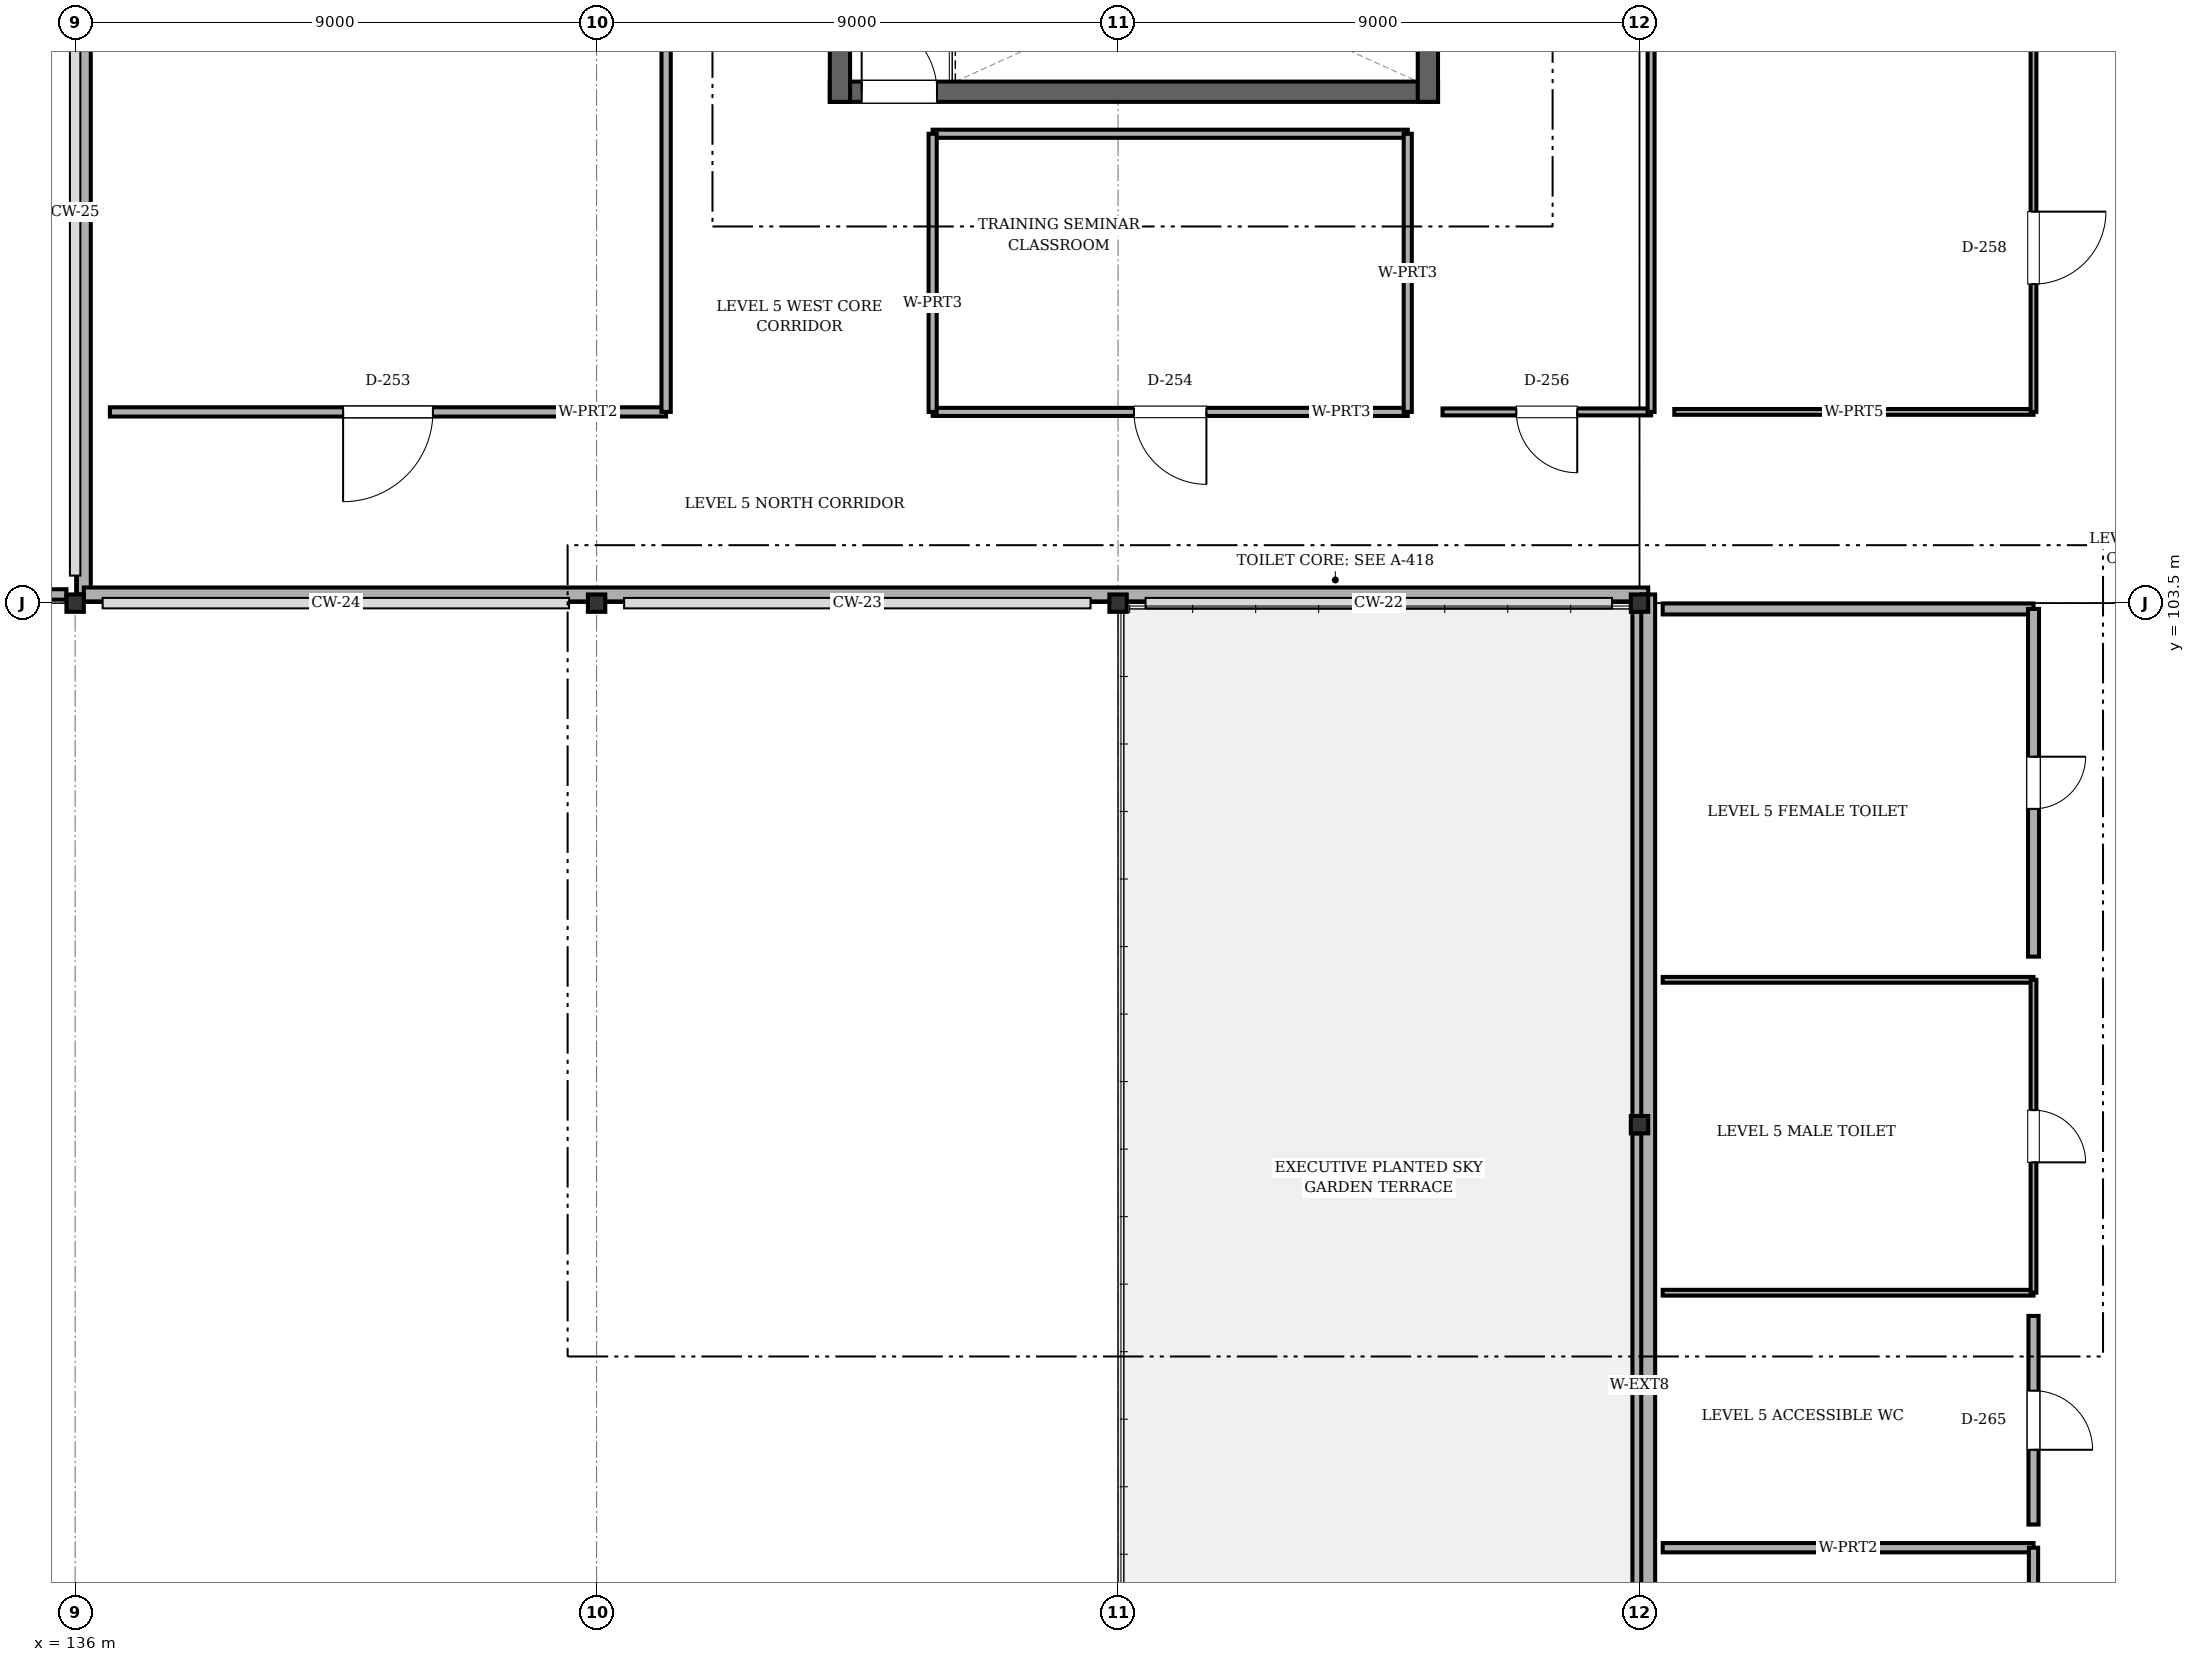
"""IFC4 building model, lengths in metres.
Left out: names, types, materials, properties, quantities, classifications, styles, units other than length and angle.
Written with IfcOpenShell. Run it as: python <this file> out.ifc"""

import sys

from ifc_helpers import new_model, si_unit, direction, frame, frame_2d, origin, origin_2d, place, context, subcontext, project, spatial, rectangle, i_section, extrude, element, fill, save


model = new_model("IFC4")
c1 = context("Model", 3, precision=1e-05, world=origin(), true_north=direction((0.0, 1.0)))
c2 = subcontext(c1, "Body", "Model", "MODEL_VIEW")
j1 = project(units=[si_unit("LENGTHUNIT", "METRE"), si_unit("PLANEANGLEUNIT", "RADIAN")], contexts=[c1])
p1 = place(None, origin())
s1 = spatial("IfcSite", under=j1, at=p1, CompositionType="ELEMENT")
p2 = place(p1, origin())
s2 = spatial("IfcBuilding", under=s1, at=p2, CompositionType="ELEMENT")
p3 = place(p2, frame((0.0, 0.0, 20.8)))
s3 = spatial("IfcBuildingStorey", under=s2, at=p3, CompositionType="ELEMENT", Elevation=20.8)
for number, where, z_axis, x_axis in (
    (1, (136.0, 103.5, 0.0), (0.0, 0.0, 1.0), (1.0, 0.0, 0.0)),
    (2, (145.0, 103.5, 0.0), (0.0, 0.0, 1.0), (1.0, 0.0, 0.0)),
    (3, (154.0, 103.5, 0.0), (0.0, 0.0, 1.0), (1.0, 0.0, 0.0)),
    (4, (163.0, 94.5, 0.0), (0.0, 0.0, 1.0), (1.0, 0.0, 0.0)),
    (5, (163.0, 103.5, 0.0), (0.0, 0.0, 1.0), (1.0, 0.0, 0.0)),
):
    element("IfcColumn", number, at=place(p3, frame(where, z_axis=z_axis, x_axis=x_axis)), inside=s3, PredefinedType="COLUMN", context=c2, shape_type="SweptSolid", body=[
        extrude(i_section(OverallWidth=0.3, OverallDepth=0.3, WebThickness=0.01, FlangeThickness=0.015, FilletRadius=0.018, at=origin_2d()), origin(), (0.0, 0.0, 1.0), 2.85),
    ])
p4 = place(p3, frame((163.0, 85.65, 0.0), z_axis=(0.0, 0.0, 1.0), x_axis=(0.0, 1.0, 0.0)))
e6 = element("IfcWall", 6, at=p4, inside=s3, PredefinedType="SOLIDWALL", context=c2, shape_type="SweptSolid", body=[
    extrude(rectangle(XDim=8.7, YDim=0.245, at=frame_2d((4.35, 0.0))), origin(), (0.0, 0.0, 1.0), 2.23),
])
p5 = place(p3, frame((163.0, 94.65, 0.0), z_axis=(0.0, 0.0, 1.0), x_axis=(0.0, 1.0, 0.0)))
e7 = element("IfcWall", 7, at=p5, inside=s3, PredefinedType="SOLIDWALL", context=c2, shape_type="SweptSolid", body=[
    extrude(rectangle(XDim=8.7, YDim=0.245, at=frame_2d((4.35, 0.0))), origin(), (0.0, 0.0, 1.0), 2.18),
])
p6 = place(p3, frame((126.15, 103.65, 0.0), z_axis=(0.0, 0.0, 1.0), x_axis=(1.0, 0.0, 0.0)))
e8 = element("IfcWall", 8, at=p6, inside=s3, PredefinedType="PARAPET", context=c2, shape_type="SweptSolid", body=[
    extrude(rectangle(XDim=9.7, YDim=0.18, at=frame_2d((4.85, 0.0))), origin(), (0.0, 0.0, 1.0), 1.15),
])
p7 = place(p3, frame((136.15, 125.85, 2.85), z_axis=(0.0, 0.0, 1.0), x_axis=(0.0, -1.0, 0.0)))
e9 = element("IfcWall", 9, at=p7, inside=s3, PredefinedType="PARAPET", context=c2, shape_type="SweptSolid", body=[
    extrude(rectangle(XDim=22.2, YDim=0.24, at=frame_2d((11.1, 0.0))), origin(), (0.0, 0.0, 1.0), 0.34),
])
for number, where, z_axis, x_axis in (
    (10, (136.15, 103.65, 2.85), (0.0, 0.0, 1.0), (1.0, 0.0, 0.0)),
    (11, (163.15, 103.65, 2.85), (0.0, 0.0, 1.0), (0.0, -1.0, 0.0)),
):
    element("IfcWall", number, at=place(p3, frame(where, z_axis=z_axis, x_axis=x_axis)), inside=s3, PredefinedType="PARAPET", context=c2, shape_type="SweptSolid", body=[
        extrude(rectangle(XDim=27.0, YDim=0.24, at=frame_2d((13.5, 0.0))), origin(), (0.0, 0.0, 1.0), 0.34),
    ])
p8 = place(p3, frame((149.025, 112.325, 0.0), z_axis=(0.0, 0.0, 1.0), x_axis=(1.0, 0.0, 0.0)))
e12 = element("IfcWall", 12, at=p8, inside=s3, PredefinedType="SHEAR", context=c2, shape_type="SweptSolid", body=[
    extrude(rectangle(XDim=10.498, YDim=0.35, at=frame_2d((5.249, 0.0))), origin(), (0.0, 0.0, 1.0), 2.645),
])
p9 = place(p8, frame((0.55, 0.0, 0.0)))
e13 = element("IfcOpeningElement", 13, at=p9, cuts=e12, PredefinedType="OPENING", context=c2, shape_type="SweptSolid", body=[
    extrude(rectangle(XDim=1.3, YDim=2.1, at=frame_2d((0.65, 1.05))), frame((0.0, 0.185, 0.0), z_axis=(0.0, -1.0, 0.0), x_axis=(1.0, 0.0, 0.0)), (0.0, 0.0, 1.0), 0.37),
])
for number, where, z_axis, x_axis in (
    (14, (159.347, 112.15, 0.0), (0.0, 0.0, 1.0), (0.0, 1.0, 0.0)),
    (15, (149.2, 116.47, 0.0), (0.0, 0.0, 1.0), (0.0, -1.0, 0.0)),
):
    element("IfcWall", number, at=place(p3, frame(where, z_axis=z_axis, x_axis=x_axis)), inside=s3, PredefinedType="SHEAR", context=c2, shape_type="SweptSolid", body=[
        extrude(rectangle(XDim=4.32, YDim=0.35, at=frame_2d((2.16, 0.0))), origin(), (0.0, 0.0, 1.0), 2.645),
    ])
p10 = place(p3, frame((146.2, 106.8, 0.0), z_axis=(0.0, 0.0, 1.0), x_axis=(-1.0, 0.0, 0.0)))
e16 = element("IfcWall", 16, at=p10, inside=s3, PredefinedType="PARTITIONING", context=c2, shape_type="SweptSolid", body=[
    extrude(rectangle(XDim=9.6, YDim=0.16, at=frame_2d((4.8, 0.0))), origin(), (0.0, 0.0, 1.0), 2.18),
])
p11 = place(p10, frame((4.025, 0.0, 0.0)))
e17 = element("IfcOpeningElement", 17, at=p11, cuts=e16, PredefinedType="OPENING", context=c2, shape_type="SweptSolid", body=[
    extrude(rectangle(XDim=1.55, YDim=2.1, at=frame_2d((0.775, 1.05))), frame((0.0, 0.09, 0.0), z_axis=(0.0, -1.0, 0.0), x_axis=(1.0, 0.0, 0.0)), (0.0, 0.0, 1.0), 0.18),
])
p12 = place(p3, frame((146.2, 125.4, 0.0), z_axis=(0.0, 0.0, 1.0), x_axis=(0.0, -1.0, 0.0)))
e18 = element("IfcWall", 18, at=p12, inside=s3, PredefinedType="PARTITIONING", context=c2, shape_type="SweptSolid", body=[
    extrude(rectangle(XDim=18.6, YDim=0.16, at=frame_2d((9.3, 0.0))), origin(), (0.0, 0.0, 1.0), 2.23),
])
p13 = place(p3, frame((159.0, 106.8, 0.0), z_axis=(0.0, 0.0, 1.0), x_axis=(-1.0, 0.0, 0.0)))
e19 = element("IfcWall", 19, at=p13, inside=s3, PredefinedType="PARTITIONING", context=c2, shape_type="SweptSolid", body=[
    extrude(rectangle(XDim=8.2, YDim=0.14, at=frame_2d((4.1, 0.0))), origin(), (0.0, 0.0, 1.0), 2.18),
])
p14 = place(p13, frame((3.475, 0.0, 0.0)))
e20 = element("IfcOpeningElement", 20, at=p14, cuts=e19, PredefinedType="OPENING", context=c2, shape_type="SweptSolid", body=[
    extrude(rectangle(XDim=1.25, YDim=2.1, at=frame_2d((0.625, 1.05))), frame((0.0, 0.08, 0.0), z_axis=(0.0, -1.0, 0.0), x_axis=(1.0, 0.0, 0.0)), (0.0, 0.0, 1.0), 0.16),
])
p15 = place(p3, frame((150.8, 111.6, 0.0), z_axis=(0.0, 0.0, 1.0), x_axis=(1.0, 0.0, 0.0)))
e21 = element("IfcWall", 21, at=p15, inside=s3, PredefinedType="PARTITIONING", context=c2, shape_type="SweptSolid", body=[
    extrude(rectangle(XDim=8.2, YDim=0.14, at=frame_2d((4.1, 0.0))), origin(), (0.0, 0.0, 1.0), 2.18),
])
p16 = place(p3, frame((150.8, 106.8, 0.0), z_axis=(0.0, 0.0, 1.0), x_axis=(0.0, 1.0, 0.0)))
e22 = element("IfcWall", 22, at=p16, inside=s3, PredefinedType="PARTITIONING", context=c2, shape_type="SweptSolid", body=[
    extrude(rectangle(XDim=4.8, YDim=0.14, at=frame_2d((2.4, 0.0))), origin(), (0.0, 0.0, 1.0), 2.62),
])
p17 = place(p3, frame((159.0, 111.6, 0.0), z_axis=(0.0, 0.0, 1.0), x_axis=(0.0, -1.0, 0.0)))
e23 = element("IfcWall", 23, at=p17, inside=s3, PredefinedType="PARTITIONING", context=c2, shape_type="SweptSolid", body=[
    extrude(rectangle(XDim=4.8, YDim=0.14, at=frame_2d((2.4, 0.0))), origin(), (0.0, 0.0, 1.0), 2.22),
])
p18 = place(p3, frame((163.2, 106.8, 0.0), z_axis=(0.0, 0.0, 1.0), x_axis=(-1.0, 0.0, 0.0)))
e24 = element("IfcWall", 24, at=p18, inside=s3, PredefinedType="PARTITIONING", context=c2, shape_type="SweptSolid", body=[
    extrude(rectangle(XDim=3.6, YDim=0.12, at=frame_2d((1.8, 0.0))), origin(), (0.0, 0.0, 1.0), 2.18),
])
p19 = place(p18, frame((1.275, 0.0, 0.0)))
e25 = element("IfcOpeningElement", 25, at=p19, cuts=e24, PredefinedType="OPENING", context=c2, shape_type="SweptSolid", body=[
    extrude(rectangle(XDim=1.05, YDim=2.1, at=frame_2d((0.525, 1.05))), frame((0.0, 0.07, 0.0), z_axis=(0.0, -1.0, 0.0), x_axis=(1.0, 0.0, 0.0)), (0.0, 0.0, 1.0), 0.14),
])
p20 = place(p3, frame((163.2, 121.2, 0.0), z_axis=(0.0, 0.0, 1.0), x_axis=(0.0, -1.0, 0.0)))
e26 = element("IfcWall", 26, at=p20, inside=s3, PredefinedType="PARTITIONING", context=c2, shape_type="SweptSolid", body=[
    extrude(rectangle(XDim=14.4, YDim=0.12, at=frame_2d((7.2, 0.0))), origin(), (0.0, 0.0, 1.0), 2.18),
])
p21 = place(p3, frame((169.8, 106.8, 0.0), z_axis=(0.0, 0.0, 1.0), x_axis=(-1.0, 0.0, 0.0)))
e27 = element("IfcWall", 27, at=p21, inside=s3, PredefinedType="PARTITIONING", context=c2, shape_type="SweptSolid", body=[
    extrude(rectangle(XDim=6.2, YDim=0.1, at=frame_2d((3.1, 0.0))), origin(), (0.0, 0.0, 1.0), 2.18),
])
p22 = place(p3, frame((169.8, 121.2, 0.0), z_axis=(0.0, 0.0, 1.0), x_axis=(0.0, -1.0, 0.0)))
e28 = element("IfcWall", 28, at=p22, inside=s3, PredefinedType="PARTITIONING", context=c2, shape_type="SweptSolid", body=[
    extrude(rectangle(XDim=14.4, YDim=0.1, at=frame_2d((7.2, 0.0))), origin(), (0.0, 0.0, 1.0), 2.23),
])
p23 = place(p22, frame((6.575, 0.0, 0.0)))
e29 = element("IfcOpeningElement", 29, at=p23, cuts=e28, PredefinedType="OPENING", context=c2, shape_type="SweptSolid", body=[
    extrude(rectangle(XDim=1.25, YDim=2.1, at=frame_2d((0.625, 1.05))), frame((0.0, 0.06, 0.0), z_axis=(0.0, -1.0, 0.0), x_axis=(1.0, 0.0, 0.0)), (0.0, 0.0, 1.0), 0.12),
])
p24 = place(p22, frame((10.944, 0.0, 0.0)))
e30 = element("IfcOpeningElement", 30, at=p24, cuts=e28, PredefinedType="OPENING", context=c2, shape_type="SweptSolid", body=[
    extrude(rectangle(XDim=1.25, YDim=2.1, at=frame_2d((0.625, 1.05))), frame((0.0, 0.06, 0.0), z_axis=(0.0, -1.0, 0.0), x_axis=(1.0, 0.0, 0.0)), (0.0, 0.0, 1.0), 0.12),
])
p25 = place(p3, frame((163.4, 87.2, 0.0), z_axis=(0.0, 0.0, 1.0), x_axis=(1.0, 0.0, 0.0)))
e31 = element("IfcWall", 31, at=p25, inside=s3, PredefinedType="PARTITIONING", context=c2, shape_type="SweptSolid", body=[
    extrude(rectangle(XDim=6.4, YDim=0.16, at=frame_2d((3.2, 0.0))), origin(), (0.0, 0.0, 1.0), 2.23),
])
p26 = place(p3, frame((169.8, 87.2, 0.0), z_axis=(0.0, 0.0, 1.0), x_axis=(0.0, -1.0, 0.0)))
e32 = element("IfcWall", 32, at=p26, inside=s3, PredefinedType="PARTITIONING", context=c2, shape_type="SweptSolid", body=[
    extrude(rectangle(XDim=10.2, YDim=0.16, at=frame_2d((5.1, 0.0))), origin(), (0.0, 0.0, 1.0), 2.23),
])
p27 = place(p26, frame((4.575, 0.0, 0.0)))
e33 = element("IfcOpeningElement", 33, at=p27, cuts=e32, PredefinedType="OPENING", context=c2, shape_type="SweptSolid", body=[
    extrude(rectangle(XDim=1.05, YDim=2.1, at=frame_2d((0.525, 1.05))), frame((0.0, 0.09, 0.0), z_axis=(0.0, -1.0, 0.0), x_axis=(1.0, 0.0, 0.0)), (0.0, 0.0, 1.0), 0.18),
])
for number, where, z_axis, x_axis in (
    (34, (169.8, 91.6, 0.0), (0.0, 0.0, 1.0), (-1.0, 0.0, 0.0)),
    (35, (163.4, 97.0, 0.0), (0.0, 0.0, 1.0), (1.0, 0.0, 0.0)),
):
    element("IfcWall", number, at=place(p3, frame(where, z_axis=z_axis, x_axis=x_axis)), inside=s3, PredefinedType="PARTITIONING", context=c2, shape_type="SweptSolid", body=[
        extrude(rectangle(XDim=6.4, YDim=0.1, at=frame_2d((3.2, 0.0))), origin(), (0.0, 0.0, 1.0), 2.23),
    ])
p28 = place(p3, frame((169.8, 97.0, 0.0), z_axis=(0.0, 0.0, 1.0), x_axis=(0.0, -1.0, 0.0)))
e36 = element("IfcWall", 36, at=p28, inside=s3, PredefinedType="PARTITIONING", context=c2, shape_type="SweptSolid", body=[
    extrude(rectangle(XDim=5.4, YDim=0.1, at=frame_2d((2.7, 0.0))), origin(), (0.0, 0.0, 1.0), 2.23),
])
p29 = place(p28, frame((2.25, 0.0, 0.0)))
e37 = element("IfcOpeningElement", 37, at=p29, cuts=e36, PredefinedType="OPENING", context=c2, shape_type="SweptSolid", body=[
    extrude(rectangle(XDim=0.9, YDim=2.1, at=frame_2d((0.45, 1.05))), frame((0.0, 0.06, 0.0), z_axis=(0.0, -1.0, 0.0), x_axis=(1.0, 0.0, 0.0)), (0.0, 0.0, 1.0), 0.12),
])
p30 = place(p3, frame((163.4, 103.4, 0.0), z_axis=(0.0, 0.0, 1.0), x_axis=(1.0, 0.0, 0.0)))
e38 = element("IfcWall", 38, at=p30, inside=s3, PredefinedType="PARTITIONING", context=c2, shape_type="SweptSolid", body=[
    extrude(rectangle(XDim=6.4, YDim=0.19, at=frame_2d((3.2, 0.0))), origin(), (0.0, 0.0, 1.0), 2.18),
])
p31 = place(p3, frame((169.8, 103.4, 0.0), z_axis=(0.0, 0.0, 1.0), x_axis=(0.0, -1.0, 0.0)))
e39 = element("IfcWall", 39, at=p31, inside=s3, PredefinedType="PARTITIONING", context=c2, shape_type="SweptSolid", body=[
    extrude(rectangle(XDim=6.0, YDim=0.19, at=frame_2d((3.0, 0.0))), origin(), (0.0, 0.0, 1.0), 2.23),
])
p32 = place(p31, frame((2.55, 0.0, 0.0)))
e40 = element("IfcOpeningElement", 40, at=p32, cuts=e39, PredefinedType="OPENING", context=c2, shape_type="SweptSolid", body=[
    extrude(rectangle(XDim=0.9, YDim=2.1, at=frame_2d((0.45, 1.05))), frame((0.0, 0.105, 0.0), z_axis=(0.0, -1.0, 0.0), x_axis=(1.0, 0.0, 0.0)), (0.0, 0.0, 1.0), 0.21),
])
p33 = place(p3, frame((169.8, 91.2, 0.0), z_axis=(0.0, 0.0, 1.0), x_axis=(0.0, -1.0, 0.0)))
e41 = element("IfcWall", 41, at=p33, inside=s3, PredefinedType="PARTITIONING", context=c2, shape_type="SweptSolid", body=[
    extrude(rectangle(XDim=3.6, YDim=0.175, at=frame_2d((1.8, 0.0))), origin(), (0.0, 0.0, 1.0), 2.62),
])
p34 = place(p33, frame((1.29, 0.0, 0.0)))
e42 = element("IfcOpeningElement", 42, at=p34, cuts=e41, PredefinedType="OPENING", context=c2, shape_type="SweptSolid", body=[
    extrude(rectangle(XDim=1.02, YDim=2.05, at=frame_2d((0.51, 1.025))), frame((0.0, 0.097, 0.0), z_axis=(0.0, -1.0, 0.0), x_axis=(1.0, 0.0, 0.0)), (0.0, 0.0, 1.0), 0.195),
])
p35 = place(p9, origin())
e43 = element("IfcDoor", 43, at=p35, inside=s3, OperationType="SINGLE_SWING_LEFT", PredefinedType="DOOR", context=c2, shape_type="SweptSolid", body=[
    extrude(rectangle(XDim=1.3, YDim=2.1, at=frame_2d((0.65, 1.05))), frame((0.0, 0.025, 0.0), z_axis=(0.0, -1.0, 0.0), x_axis=(1.0, 0.0, 0.0)), (0.0, 0.0, 1.0), 0.05),
])
fill(e13, e43)
p36 = place(p11, origin())
e44 = element("IfcDoor", 44, at=p36, inside=s3, OperationType="SINGLE_SWING_RIGHT", PredefinedType="DOOR", context=c2, shape_type="SweptSolid", body=[
    extrude(rectangle(XDim=1.55, YDim=2.1, at=frame_2d((0.775, 1.05))), frame((0.0, 0.025, 0.0), z_axis=(0.0, -1.0, 0.0), x_axis=(1.0, 0.0, 0.0)), (0.0, 0.0, 1.0), 0.05),
])
fill(e17, e44)
p37 = place(p14, origin())
e45 = element("IfcDoor", 45, at=p37, inside=s3, OperationType="SINGLE_SWING_LEFT", PredefinedType="DOOR", context=c2, shape_type="SweptSolid", body=[
    extrude(rectangle(XDim=1.25, YDim=2.1, at=frame_2d((0.625, 1.05))), frame((0.0, 0.025, 0.0), z_axis=(0.0, -1.0, 0.0), x_axis=(1.0, 0.0, 0.0)), (0.0, 0.0, 1.0), 0.05),
])
fill(e20, e45)
p38 = place(p19, origin())
e46 = element("IfcDoor", 46, at=p38, inside=s3, OperationType="SINGLE_SWING_LEFT", PredefinedType="DOOR", context=c2, shape_type="SweptSolid", body=[
    extrude(rectangle(XDim=1.05, YDim=2.1, at=frame_2d((0.525, 1.05))), frame((0.0, 0.025, 0.0), z_axis=(0.0, -1.0, 0.0), x_axis=(1.0, 0.0, 0.0)), (0.0, 0.0, 1.0), 0.05),
])
fill(e25, e46)
p39 = place(p24, origin())
e47 = element("IfcDoor", 47, at=p39, inside=s3, OperationType="SINGLE_SWING_LEFT", PredefinedType="DOOR", context=c2, shape_type="SweptSolid", body=[
    extrude(rectangle(XDim=1.25, YDim=2.1, at=frame_2d((0.625, 1.05))), frame((0.0, 0.025, 0.0), z_axis=(0.0, -1.0, 0.0), x_axis=(1.0, 0.0, 0.0)), (0.0, 0.0, 1.0), 0.05),
])
fill(e30, e47)
p40 = place(p29, origin())
e48 = element("IfcDoor", 48, at=p40, inside=s3, OperationType="SINGLE_SWING_RIGHT", PredefinedType="DOOR", context=c2, shape_type="SweptSolid", body=[
    extrude(rectangle(XDim=0.9, YDim=2.1, at=frame_2d((0.45, 1.05))), frame((0.0, 0.025, 0.0), z_axis=(0.0, -1.0, 0.0), x_axis=(1.0, 0.0, 0.0)), (0.0, 0.0, 1.0), 0.05),
])
fill(e37, e48)
p41 = place(p32, origin())
e49 = element("IfcDoor", 49, at=p41, inside=s3, OperationType="SINGLE_SWING_LEFT", PredefinedType="DOOR", context=c2, shape_type="SweptSolid", body=[
    extrude(rectangle(XDim=0.9, YDim=2.1, at=frame_2d((0.45, 1.05))), frame((0.0, 0.025, 0.0), z_axis=(0.0, -1.0, 0.0), x_axis=(1.0, 0.0, 0.0)), (0.0, 0.0, 1.0), 0.05),
])
fill(e40, e49)
p42 = place(p34, origin())
e50 = element("IfcDoor", 50, at=p42, inside=s3, OperationType="SINGLE_SWING_RIGHT", PredefinedType="DOOR", context=c2, shape_type="SweptSolid", body=[
    extrude(rectangle(XDim=1.02, YDim=2.05, at=frame_2d((0.51, 1.025))), frame((0.0, 0.025, 0.0), z_axis=(0.0, -1.0, 0.0), x_axis=(1.0, 0.0, 0.0)), (0.0, 0.0, 1.0), 0.05),
])
fill(e42, e50)
save(model, sys.argv[1])
